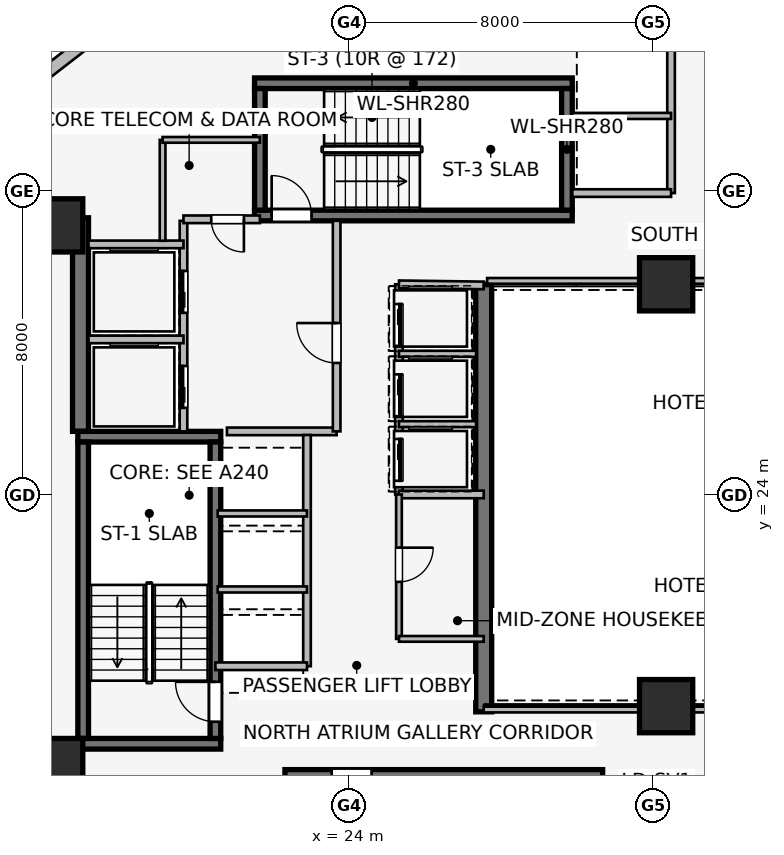
"""IFC4 building model, lengths in metres.
Left out: names, types, materials, properties, quantities, classifications, styles, units other than length and angle.
Written with IfcOpenShell. Run it as: python <this file> out.ifc"""

import sys

from ifc_helpers import new_model, si_unit, direction, frame, frame_2d, origin, origin_2d, place, context, subcontext, project, spatial, rectangle, extrude, element, fill, save


model = new_model("IFC4")
c1 = context("Model", 3, precision=1e-05, world=origin(), true_north=direction((0.0, 1.0)))
c2 = subcontext(c1, "Body", "Model", "MODEL_VIEW")
j1 = project(units=[si_unit("LENGTHUNIT", "METRE"), si_unit("PLANEANGLEUNIT", "RADIAN")], contexts=[c1])
p1 = place(None, origin())
s1 = spatial("IfcSite", under=j1, at=p1, CompositionType="ELEMENT")
p2 = place(p1, origin())
s2 = spatial("IfcBuilding", under=s1, at=p2, CompositionType="ELEMENT")
p3 = place(p2, frame((0.0, 0.0, 142.95)))
s3 = spatial("IfcBuildingStorey", under=s2, at=p3, CompositionType="ELEMENT", Elevation=142.95)
p4 = place(p3, frame((16.94, 25.68, 0.0), z_axis=(0.0, 0.0, 1.0), x_axis=(0.0, 1.0, 0.0)))
e1 = element("IfcWall", 1, at=p4, inside=s3, PredefinedType="SHEAR", context=c2, shape_type="SweptSolid", body=[
    extrude(rectangle(XDim=5.62, YDim=0.42, at=frame_2d((2.81, 0.0))), origin(), (0.0, 0.0, 1.0), 3.45),
])
p5 = place(p3, frame((27.55, 29.55, 0.0), z_axis=(0.0, 0.0, 1.0), x_axis=(0.0, -1.0, 0.0)))
e2 = element("IfcWall", 2, at=p5, inside=s3, PredefinedType="SHEAR", context=c2, shape_type="SweptSolid", body=[
    extrude(rectangle(XDim=11.25, YDim=0.42, at=frame_2d((5.625, 0.0))), origin(), (0.0, 0.0, 1.0), 3.45),
])
for number, where, z_axis, x_axis in (
    (3, (16.87, 17.46, 0.0), (0.0, 0.0, 1.0), (1.0, 0.0, 0.0)),
    (4, (20.63, 25.54, 0.0), (0.0, 0.0, 1.0), (-1.0, 0.0, 0.0)),
):
    element("IfcWall", number, at=place(p3, frame(where, z_axis=z_axis, x_axis=x_axis)), inside=s3, PredefinedType="SHEAR", context=c2, shape_type="SweptSolid", body=[
        extrude(rectangle(XDim=3.76, YDim=0.28, at=frame_2d((1.88, 0.0))), origin(), (0.0, 0.0, 1.0), 3.45),
    ])
p6 = place(p3, frame((17.01, 25.4, 0.0), z_axis=(0.0, 0.0, 1.0), x_axis=(0.0, -1.0, 0.0)))
e5 = element("IfcWall", 5, at=p6, inside=s3, PredefinedType="SHEAR", context=c2, shape_type="SweptSolid", body=[
    extrude(rectangle(XDim=7.8, YDim=0.28, at=frame_2d((3.9, 0.0))), origin(), (0.0, 0.0, 1.0), 3.45),
])
p7 = place(p3, frame((20.49, 17.6, 0.0), z_axis=(0.0, 0.0, 1.0), x_axis=(0.0, 1.0, 0.0)))
e6 = element("IfcWall", 6, at=p7, inside=s3, PredefinedType="SHEAR", context=c2, shape_type="SweptSolid", body=[
    extrude(rectangle(XDim=7.8, YDim=0.28, at=frame_2d((3.9, 0.0))), origin(), (0.0, 0.0, 1.0), 3.45),
])
p8 = place(p7, frame((0.44, 0.0, 0.0)))
e7 = element("IfcOpeningElement", 7, at=p8, cuts=e6, PredefinedType="OPENING", context=c2, shape_type="SweptSolid", body=[
    extrude(rectangle(XDim=1.05, YDim=2.0, at=frame_2d((0.525, 1.0))), frame((0.0, 0.15, 0.0), z_axis=(0.0, -1.0, 0.0), x_axis=(1.0, 0.0, 0.0)), (0.0, 0.0, 1.0), 0.3),
])
p9 = place(p3, frame((30.68, 16.64, 0.0), z_axis=(0.0, 0.0, 1.0), x_axis=(-1.0, 0.0, 0.0)))
e8 = element("IfcWall", 8, at=p9, inside=s3, PredefinedType="SHEAR", context=c2, shape_type="SweptSolid", body=[
    extrude(rectangle(XDim=8.36, YDim=0.28, at=frame_2d((4.18, 0.0))), origin(), (0.0, 0.0, 1.0), 3.45),
])
p10 = place(p9, frame((6.08, 0.0, 0.0)))
e9 = element("IfcOpeningElement", 9, at=p10, cuts=e8, PredefinedType="OPENING", context=c2, shape_type="SweptSolid", body=[
    extrude(rectangle(XDim=1.05, YDim=2.0, at=frame_2d((0.525, 1.0))), frame((0.0, 0.15, 0.0), z_axis=(0.0, -1.0, 0.0), x_axis=(1.0, 0.0, 0.0)), (0.0, 0.0, 1.0), 0.3),
])
p11 = place(p3, frame((21.52, 31.36, 0.0), z_axis=(0.0, 0.0, 1.0), x_axis=(1.0, 0.0, 0.0)))
e10 = element("IfcWall", 10, at=p11, inside=s3, PredefinedType="SHEAR", context=c2, shape_type="SweptSolid", body=[
    extrude(rectangle(XDim=8.36, YDim=0.28, at=frame_2d((4.18, 0.0))), origin(), (0.0, 0.0, 1.0), 3.45),
])
p12 = place(p11, frame((0.45, 0.0, 0.0)))
e11 = element("IfcOpeningElement", 11, at=p12, cuts=e10, PredefinedType="OPENING", context=c2, shape_type="SweptSolid", body=[
    extrude(rectangle(XDim=1.05, YDim=2.0, at=frame_2d((0.525, 1.0))), frame((0.0, 0.15, 0.0), z_axis=(0.0, -1.0, 0.0), x_axis=(1.0, 0.0, 0.0)), (0.0, 0.0, 1.0), 0.3),
])
p13 = place(p3, frame((29.88, 34.84, 0.0), z_axis=(0.0, 0.0, 1.0), x_axis=(-1.0, 0.0, 0.0)))
e12 = element("IfcWall", 12, at=p13, inside=s3, PredefinedType="SHEAR", context=c2, shape_type="SweptSolid", body=[
    extrude(rectangle(XDim=8.36, YDim=0.28, at=frame_2d((4.18, 0.0))), origin(), (0.0, 0.0, 1.0), 3.45),
])
for number, where, z_axis, x_axis in (
    (13, (21.66, 34.7, 0.0), (0.0, 0.0, 1.0), (0.0, -1.0, 0.0)),
    (14, (29.74, 31.5, 0.0), (0.0, 0.0, 1.0), (0.0, 1.0, 0.0)),
):
    element("IfcWall", number, at=place(p3, frame(where, z_axis=z_axis, x_axis=x_axis)), inside=s3, PredefinedType="SHEAR", context=c2, shape_type="SweptSolid", body=[
        extrude(rectangle(XDim=3.2, YDim=0.28, at=frame_2d((1.6, 0.0))), origin(), (0.0, 0.0, 1.0), 3.45),
    ])
for number, where, z_axis, x_axis in (
    (15, (16.3, 16.9, 0.0), (0.0, 0.0, 1.0), (1.0, 0.0, 0.0)),
    (16, (16.3, 31.1, 0.0), (0.0, 0.0, 1.0), (1.0, 0.0, 0.0)),
    (17, (32.35, 18.45, 0.0), (0.0, 0.0, 1.0), (1.0, 0.0, 0.0)),
    (18, (32.35, 29.55, 0.0), (0.0, 0.0, 1.0), (1.0, 0.0, 0.0)),
):
    element("IfcColumn", number, at=place(p3, frame(where, z_axis=z_axis, x_axis=x_axis)), inside=s3, PredefinedType="COLUMN", context=c2, shape_type="SweptSolid", body=[
        extrude(rectangle(XDim=1.4, YDim=1.4, at=origin_2d()), origin(), (0.0, 0.0, 1.0), 3.45),
    ])
p14 = place(p3, frame((15.918, 35.024, 0.0), z_axis=(0.0, 0.0, 1.0), x_axis=(0.790621329885, 0.612305408053, 0.0)))
e19 = element("IfcWall", 19, at=p14, inside=s3, PredefinedType="STANDARD", context=c2, shape_type="SweptSolid", body=[
    extrude(rectangle(XDim=1.676, YDim=0.33, at=frame_2d((0.838, 0.0))), origin(), (0.0, 0.0, 1.0), 3.16),
])
p15 = place(p3, frame((19.65, 25.68, 0.0), z_axis=(0.0, 0.0, 1.0), x_axis=(0.0, 1.0, 0.0)))
e20 = element("IfcWall", 20, at=p15, inside=s3, PredefinedType="PARTITIONING", context=c2, shape_type="SweptSolid", body=[
    extrude(rectangle(XDim=5.54, YDim=0.2, at=frame_2d((2.77, 0.0))), origin(), (0.0, 0.0, 1.0), 3.16),
])
p16 = place(p15, frame((0.62, 0.0, 0.0)))
e21 = element("IfcOpeningElement", 21, at=p16, cuts=e20, PredefinedType="OPENING", context=c2, shape_type="SweptSolid", body=[
    extrude(rectangle(XDim=1.1, YDim=2.2, at=frame_2d((0.55, 1.1))), frame((0.0, 0.11, 0.0), z_axis=(0.0, -1.0, 0.0), x_axis=(1.0, 0.0, 0.0)), (0.0, 0.0, 1.0), 0.22),
])
p17 = place(p15, frame((3.12, 0.0, 0.0)))
e22 = element("IfcOpeningElement", 22, at=p17, cuts=e20, PredefinedType="OPENING", context=c2, shape_type="SweptSolid", body=[
    extrude(rectangle(XDim=1.1, YDim=2.2, at=frame_2d((0.55, 1.1))), frame((0.0, 0.11, 0.0), z_axis=(0.0, -1.0, 0.0), x_axis=(1.0, 0.0, 0.0)), (0.0, 0.0, 1.0), 0.22),
])
p18 = place(p3, frame((20.793, 25.68, 0.0), z_axis=(0.0, 0.0, 1.0), x_axis=(1.0, 0.0, 0.0)))
e23 = element("IfcWall", 23, at=p18, inside=s3, PredefinedType="PARTITIONING", context=c2, shape_type="SweptSolid", body=[
    extrude(rectangle(XDim=2.887, YDim=0.2, at=frame_2d((1.443, 0.0))), origin(), (0.0, 0.0, 1.0), 3.16),
])
p19 = place(p3, frame((23.68, 25.68, 0.0), z_axis=(0.0, 0.0, 1.0), x_axis=(0.0, 1.0, 0.0)))
e24 = element("IfcWall", 24, at=p19, inside=s3, PredefinedType="PARTITIONING", context=c2, shape_type="SweptSolid", body=[
    extrude(rectangle(XDim=5.54, YDim=0.2, at=frame_2d((2.77, 0.0))), origin(), (0.0, 0.0, 1.0), 3.16),
])
p20 = place(p19, frame((1.8, 0.0, 0.0)))
e25 = element("IfcOpeningElement", 25, at=p20, cuts=e24, PredefinedType="OPENING", context=c2, shape_type="SweptSolid", body=[
    extrude(rectangle(XDim=1.05, YDim=2.0, at=frame_2d((0.525, 1.0))), frame((0.0, 0.11, 0.0), z_axis=(0.0, -1.0, 0.0), x_axis=(1.0, 0.0, 0.0)), (0.0, 0.0, 1.0), 0.22),
])
p21 = place(p3, frame((21.66, 31.26, 0.0), z_axis=(0.0, 0.0, 1.0), x_axis=(-1.0, 0.0, 0.0)))
e26 = element("IfcWall", 26, at=p21, inside=s3, PredefinedType="PARTITIONING", context=c2, shape_type="SweptSolid", body=[
    extrude(rectangle(XDim=2.01, YDim=0.2, at=frame_2d((1.005, 0.0))), origin(), (0.0, 0.0, 1.0), 3.16),
])
p22 = place(p21, frame((0.42, 0.0, 0.0)))
e27 = element("IfcOpeningElement", 27, at=p22, cuts=e26, PredefinedType="OPENING", context=c2, shape_type="SweptSolid", body=[
    extrude(rectangle(XDim=0.86, YDim=2.0, at=frame_2d((0.43, 1.0))), frame((0.0, 0.11, 0.0), z_axis=(0.0, -1.0, 0.0), x_axis=(1.0, 0.0, 0.0)), (0.0, 0.0, 1.0), 0.22),
])
p23 = place(p3, frame((17.15, 28.1, 0.0), z_axis=(0.0, 0.0, 1.0), x_axis=(1.0, 0.0, 0.0)))
e28 = element("IfcWall", 28, at=p23, inside=s3, PredefinedType="PARTITIONING", context=c2, shape_type="SweptSolid", body=[
    extrude(rectangle(XDim=2.5, YDim=0.2, at=frame_2d((1.25, 0.0))), origin(), (0.0, 0.0, 1.0), 3.16),
])
p24 = place(p3, frame((19.65, 30.6, 0.0), z_axis=(0.0, 0.0, 1.0), x_axis=(-1.0, 0.0, 0.0)))
e29 = element("IfcWall", 29, at=p24, inside=s3, PredefinedType="PARTITIONING", context=c2, shape_type="SweptSolid", body=[
    extrude(rectangle(XDim=2.5, YDim=0.2, at=frame_2d((1.25, 0.0))), origin(), (0.0, 0.0, 1.0), 2.06),
])
p25 = place(p3, frame((32.48, 31.95, 0.0), z_axis=(0.0, 0.0, 1.0), x_axis=(0.0, 1.0, 0.0)))
e30 = element("IfcWall", 30, at=p25, inside=s3, PredefinedType="PARTITIONING", context=c2, shape_type="SweptSolid", body=[
    extrude(rectangle(XDim=4.05, YDim=0.2, at=frame_2d((2.025, 0.0))), origin(), (0.0, 0.0, 1.0), 3.16),
])
p26 = place(p3, frame((32.48, 31.95, 0.0), z_axis=(0.0, 0.0, 1.0), x_axis=(-1.0, 0.0, 0.0)))
e31 = element("IfcWall", 31, at=p26, inside=s3, PredefinedType="PARTITIONING", context=c2, shape_type="SweptSolid", body=[
    extrude(rectangle(XDim=2.6, YDim=0.2, at=frame_2d((1.3, 0.0))), origin(), (0.0, 0.0, 1.0), 3.16),
])
p27 = place(p3, frame((29.875, 33.98, 0.0), z_axis=(0.0, 0.0, 1.0), x_axis=(1.0, 0.0, 0.0)))
e32 = element("IfcWall", 32, at=p27, inside=s3, PredefinedType="PARTITIONING", context=c2, shape_type="SweptSolid", body=[
    extrude(rectangle(XDim=2.605, YDim=0.16, at=frame_2d((1.302, 0.0))), origin(), (0.0, 0.0, 1.0), 3.16),
])
p28 = place(p3, frame((22.9, 19.5, 0.0), z_axis=(0.0, 0.0, 1.0), x_axis=(0.0, 1.0, 0.0)))
e33 = element("IfcWall", 33, at=p28, inside=s3, PredefinedType="PARTITIONING", context=c2, shape_type="SweptSolid", body=[
    extrude(rectangle(XDim=6.085, YDim=0.2, at=frame_2d((3.042, 0.0))), origin(), (0.0, 0.0, 1.0), 3.16),
])
p29 = place(p3, frame((20.49, 19.5, 0.0), z_axis=(0.0, 0.0, 1.0), x_axis=(1.0, 0.0, 0.0)))
e34 = element("IfcWall", 34, at=p29, inside=s3, PredefinedType="PARTITIONING", context=c2, shape_type="SweptSolid", body=[
    extrude(rectangle(XDim=2.41, YDim=0.2, at=frame_2d((1.205, 0.0))), origin(), (0.0, 0.0, 1.0), 2.06),
])
for number, where, z_axis, x_axis in (
    (35, (20.55, 21.52, 0.0), (0.0, 0.0, 1.0), (1.0, 0.0, 0.0)),
    (36, (20.55, 23.52, 0.0), (0.0, 0.0, 1.0), (1.0, 0.0, 0.0)),
):
    element("IfcWall", number, at=place(p3, frame(where, z_axis=z_axis, x_axis=x_axis)), inside=s3, PredefinedType="PARTITIONING", context=c2, shape_type="SweptSolid", body=[
        extrude(rectangle(XDim=2.35, YDim=0.16, at=frame_2d((1.175, 0.0))), origin(), (0.0, 0.0, 1.0), 3.16),
    ])
p30 = place(p3, frame((25.32, 29.55, 0.0), z_axis=(0.0, 0.0, 1.0), x_axis=(0.0, -1.0, 0.0)))
e37 = element("IfcWall", 37, at=p30, inside=s3, PredefinedType="PARTITIONING", context=c2, shape_type="SweptSolid", body=[
    extrude(rectangle(XDim=5.53, YDim=0.2, at=frame_2d((2.765, 0.0))), origin(), (0.0, 0.0, 1.0), 3.16),
])
p31 = place(p30, frame((0.52, 0.0, 0.0)))
e38 = element("IfcOpeningElement", 38, at=p31, cuts=e37, PredefinedType="OPENING", context=c2, shape_type="SweptSolid", body=[
    extrude(rectangle(XDim=1.1, YDim=2.2, at=frame_2d((0.55, 1.1))), frame((0.0, 0.11, 0.0), z_axis=(0.0, -1.0, 0.0), x_axis=(1.0, 0.0, 0.0)), (0.0, 0.0, 1.0), 0.22),
])
p32 = place(p30, frame((2.37, 0.0, 0.0)))
e39 = element("IfcOpeningElement", 39, at=p32, cuts=e37, PredefinedType="OPENING", context=c2, shape_type="SweptSolid", body=[
    extrude(rectangle(XDim=1.1, YDim=2.2, at=frame_2d((0.55, 1.1))), frame((0.0, 0.11, 0.0), z_axis=(0.0, -1.0, 0.0), x_axis=(1.0, 0.0, 0.0)), (0.0, 0.0, 1.0), 0.22),
])
p33 = place(p30, frame((4.07, 0.0, 0.0)))
e40 = element("IfcOpeningElement", 40, at=p33, cuts=e37, PredefinedType="OPENING", context=c2, shape_type="SweptSolid", body=[
    extrude(rectangle(XDim=1.1, YDim=2.2, at=frame_2d((0.55, 1.1))), frame((0.0, 0.11, 0.0), z_axis=(0.0, -1.0, 0.0), x_axis=(1.0, 0.0, 0.0)), (0.0, 0.0, 1.0), 0.22),
])
p34 = place(p3, frame((27.55, 29.52, 0.0), z_axis=(0.0, 0.0, 1.0), x_axis=(-0.999909343457, 0.013464949556, 0.0)))
e41 = element("IfcWall", 41, at=p34, inside=s3, PredefinedType="PARTITIONING", context=c2, shape_type="SweptSolid", body=[
    extrude(rectangle(XDim=2.23, YDim=0.2, at=frame_2d((1.115, 0.0))), origin(), (0.0, 0.0, 1.0), 2.06),
])
p35 = place(p3, frame((25.32, 24.02, 0.0), z_axis=(0.0, 0.0, 1.0), x_axis=(1.0, 0.0, 0.0)))
e42 = element("IfcWall", 42, at=p35, inside=s3, PredefinedType="PARTITIONING", context=c2, shape_type="SweptSolid", body=[
    extrude(rectangle(XDim=2.23, YDim=0.2, at=frame_2d((1.115, 0.0))), origin(), (0.0, 0.0, 1.0), 3.16),
])
for number, where, z_axis, x_axis in (
    (43, (25.32, 25.87, 0.0), (0.0, 0.0, 1.0), (1.0, 0.0, 0.0)),
    (44, (25.32, 27.72, 0.0), (0.0, 0.0, 1.0), (1.0, 0.0, 0.0)),
):
    element("IfcWall", number, at=place(p3, frame(where, z_axis=z_axis, x_axis=x_axis)), inside=s3, PredefinedType="PARTITIONING", context=c2, shape_type="SweptSolid", body=[
        extrude(rectangle(XDim=2.03, YDim=0.16, at=frame_2d((1.015, 0.0))), origin(), (0.0, 0.0, 1.0), 3.16),
    ])
p36 = place(p3, frame((25.32, 24.02, 0.0), z_axis=(0.0, 0.0, 1.0), x_axis=(0.0, -1.0, 0.0)))
e45 = element("IfcWall", 45, at=p36, inside=s3, PredefinedType="PARTITIONING", context=c2, shape_type="SweptSolid", body=[
    extrude(rectangle(XDim=3.8, YDim=0.15, at=frame_2d((1.9, 0.0))), origin(), (0.0, 0.0, 1.0), 3.16),
])
p37 = place(p36, frame((1.4, 0.0, 0.0)))
e46 = element("IfcOpeningElement", 46, at=p37, cuts=e45, PredefinedType="OPENING", context=c2, shape_type="SweptSolid", body=[
    extrude(rectangle(XDim=0.9, YDim=2.0, at=frame_2d((0.45, 1.0))), frame((0.0, 0.085, 0.0), z_axis=(0.0, -1.0, 0.0), x_axis=(1.0, 0.0, 0.0)), (0.0, 0.0, 1.0), 0.17),
])
p38 = place(p3, frame((25.32, 20.22, 0.0), z_axis=(0.0, 0.0, 1.0), x_axis=(1.0, 0.0, 0.0)))
e47 = element("IfcWall", 47, at=p38, inside=s3, PredefinedType="PARTITIONING", context=c2, shape_type="SweptSolid", body=[
    extrude(rectangle(XDim=2.23, YDim=0.15, at=frame_2d((1.115, 0.0))), origin(), (0.0, 0.0, 1.0), 3.16),
])
p39 = place(p3, frame((19.1, 33.35, 0.0), z_axis=(0.0, 0.0, 1.0), x_axis=(0.0, -1.0, 0.0)))
e48 = element("IfcWall", 48, at=p39, inside=s3, PredefinedType="PARTITIONING", context=c2, shape_type="SweptSolid", body=[
    extrude(rectangle(XDim=2.655, YDim=0.15, at=frame_2d((1.328, 0.0))), origin(), (0.0, 0.0, 1.0), 2.39),
])
p40 = place(p3, frame((21.66, 33.35, 0.0), z_axis=(0.0, 0.0, 1.0), x_axis=(-1.0, 0.0, 0.0)))
e49 = element("IfcWall", 49, at=p40, inside=s3, PredefinedType="PARTITIONING", context=c2, shape_type="SweptSolid", body=[
    extrude(rectangle(XDim=2.56, YDim=0.15, at=frame_2d((1.28, 0.0))), origin(), (0.0, 0.0, 1.0), 3.16),
])
p41 = place(p3, frame((27.55, 18.36, 0.0), z_axis=(0.0, 0.0, 1.0), x_axis=(1.0, 0.0, 0.0)))
e50 = element("IfcWall", 50, at=p41, inside=s3, PredefinedType="PARTITIONING", context=c2, shape_type="SweptSolid", body=[
    extrude(rectangle(XDim=12.29, YDim=0.15, at=frame_2d((6.145, 0.0))), origin(), (0.0, 0.0, 1.0), 2.301),
])
p42 = place(p3, frame((39.84, 29.64, 0.0), z_axis=(0.0, 0.0, 1.0), x_axis=(-1.0, 0.0, 0.0)))
e51 = element("IfcWall", 51, at=p42, inside=s3, PredefinedType="PARTITIONING", context=c2, shape_type="SweptSolid", body=[
    extrude(rectangle(XDim=12.2, YDim=0.15, at=frame_2d((6.1, 0.0))), origin(), (0.0, 0.0, 1.0), 2.301),
])
p43 = place(p8, origin())
e52 = element("IfcDoor", 52, at=p43, inside=s3, OperationType="SINGLE_SWING_RIGHT", PredefinedType="DOOR", context=c2, shape_type="SweptSolid", body=[
    extrude(rectangle(XDim=1.05, YDim=2.0, at=frame_2d((0.525, 1.0))), frame((0.0, 0.025, 0.0), z_axis=(0.0, -1.0, 0.0), x_axis=(1.0, 0.0, 0.0)), (0.0, 0.0, 1.0), 0.05),
])
fill(e7, e52)
p44 = place(p10, origin())
e53 = element("IfcDoor", 53, at=p44, inside=s3, OperationType="SINGLE_SWING_RIGHT", PredefinedType="DOOR", context=c2, shape_type="SweptSolid", body=[
    extrude(rectangle(XDim=1.05, YDim=2.0, at=frame_2d((0.525, 1.0))), frame((0.0, 0.025, 0.0), z_axis=(0.0, -1.0, 0.0), x_axis=(1.0, 0.0, 0.0)), (0.0, 0.0, 1.0), 0.05),
])
fill(e9, e53)
p45 = place(p12, origin())
e54 = element("IfcDoor", 54, at=p45, inside=s3, OperationType="SINGLE_SWING_LEFT", PredefinedType="DOOR", context=c2, shape_type="SweptSolid", body=[
    extrude(rectangle(XDim=1.05, YDim=2.0, at=frame_2d((0.525, 1.0))), frame((0.0, 0.025, 0.0), z_axis=(0.0, -1.0, 0.0), x_axis=(1.0, 0.0, 0.0)), (0.0, 0.0, 1.0), 0.05),
])
fill(e11, e54)
p46 = place(p16, origin())
e55 = element("IfcDoor", 55, at=p46, inside=s3, OperationType="SLIDING_TO_LEFT", PredefinedType="DOOR", context=c2, shape_type="SweptSolid", body=[
    extrude(rectangle(XDim=1.1, YDim=2.2, at=frame_2d((0.55, 1.1))), frame((0.0, 0.025, 0.0), z_axis=(0.0, -1.0, 0.0), x_axis=(1.0, 0.0, 0.0)), (0.0, 0.0, 1.0), 0.05),
])
fill(e21, e55)
p47 = place(p17, origin())
e56 = element("IfcDoor", 56, at=p47, inside=s3, OperationType="SLIDING_TO_LEFT", PredefinedType="DOOR", context=c2, shape_type="SweptSolid", body=[
    extrude(rectangle(XDim=1.1, YDim=2.2, at=frame_2d((0.55, 1.1))), frame((0.0, 0.025, 0.0), z_axis=(0.0, -1.0, 0.0), x_axis=(1.0, 0.0, 0.0)), (0.0, 0.0, 1.0), 0.05),
])
fill(e22, e56)
p48 = place(p20, origin())
e57 = element("IfcDoor", 57, at=p48, inside=s3, OperationType="SINGLE_SWING_RIGHT", PredefinedType="DOOR", context=c2, shape_type="SweptSolid", body=[
    extrude(rectangle(XDim=1.05, YDim=2.0, at=frame_2d((0.525, 1.0))), frame((0.0, 0.025, 0.0), z_axis=(0.0, -1.0, 0.0), x_axis=(1.0, 0.0, 0.0)), (0.0, 0.0, 1.0), 0.05),
])
fill(e25, e57)
p49 = place(p22, origin())
e58 = element("IfcDoor", 58, at=p49, inside=s3, OperationType="SINGLE_SWING_LEFT", PredefinedType="DOOR", context=c2, shape_type="SweptSolid", body=[
    extrude(rectangle(XDim=0.86, YDim=2.0, at=frame_2d((0.43, 1.0))), frame((0.0, 0.025, 0.0), z_axis=(0.0, -1.0, 0.0), x_axis=(1.0, 0.0, 0.0)), (0.0, 0.0, 1.0), 0.05),
])
fill(e27, e58)
p50 = place(p31, origin())
e59 = element("IfcDoor", 59, at=p50, inside=s3, OperationType="SLIDING_TO_LEFT", PredefinedType="DOOR", context=c2, shape_type="SweptSolid", body=[
    extrude(rectangle(XDim=1.1, YDim=2.2, at=frame_2d((0.55, 1.1))), frame((0.0, 0.025, 0.0), z_axis=(0.0, -1.0, 0.0), x_axis=(1.0, 0.0, 0.0)), (0.0, 0.0, 1.0), 0.05),
])
fill(e38, e59)
p51 = place(p32, origin())
e60 = element("IfcDoor", 60, at=p51, inside=s3, OperationType="SLIDING_TO_LEFT", PredefinedType="DOOR", context=c2, shape_type="SweptSolid", body=[
    extrude(rectangle(XDim=1.1, YDim=2.2, at=frame_2d((0.55, 1.1))), frame((0.0, 0.025, 0.0), z_axis=(0.0, -1.0, 0.0), x_axis=(1.0, 0.0, 0.0)), (0.0, 0.0, 1.0), 0.05),
])
fill(e39, e60)
p52 = place(p33, origin())
e61 = element("IfcDoor", 61, at=p52, inside=s3, OperationType="SLIDING_TO_LEFT", PredefinedType="DOOR", context=c2, shape_type="SweptSolid", body=[
    extrude(rectangle(XDim=1.1, YDim=2.2, at=frame_2d((0.55, 1.1))), frame((0.0, 0.025, 0.0), z_axis=(0.0, -1.0, 0.0), x_axis=(1.0, 0.0, 0.0)), (0.0, 0.0, 1.0), 0.05),
])
fill(e40, e61)
p53 = place(p37, origin())
e62 = element("IfcDoor", 62, at=p53, inside=s3, OperationType="SINGLE_SWING_LEFT", PredefinedType="DOOR", context=c2, shape_type="SweptSolid", body=[
    extrude(rectangle(XDim=0.9, YDim=2.0, at=frame_2d((0.45, 1.0))), frame((0.0, 0.025, 0.0), z_axis=(0.0, -1.0, 0.0), x_axis=(1.0, 0.0, 0.0)), (0.0, 0.0, 1.0), 0.05),
])
fill(e46, e62)
save(model, sys.argv[1])
